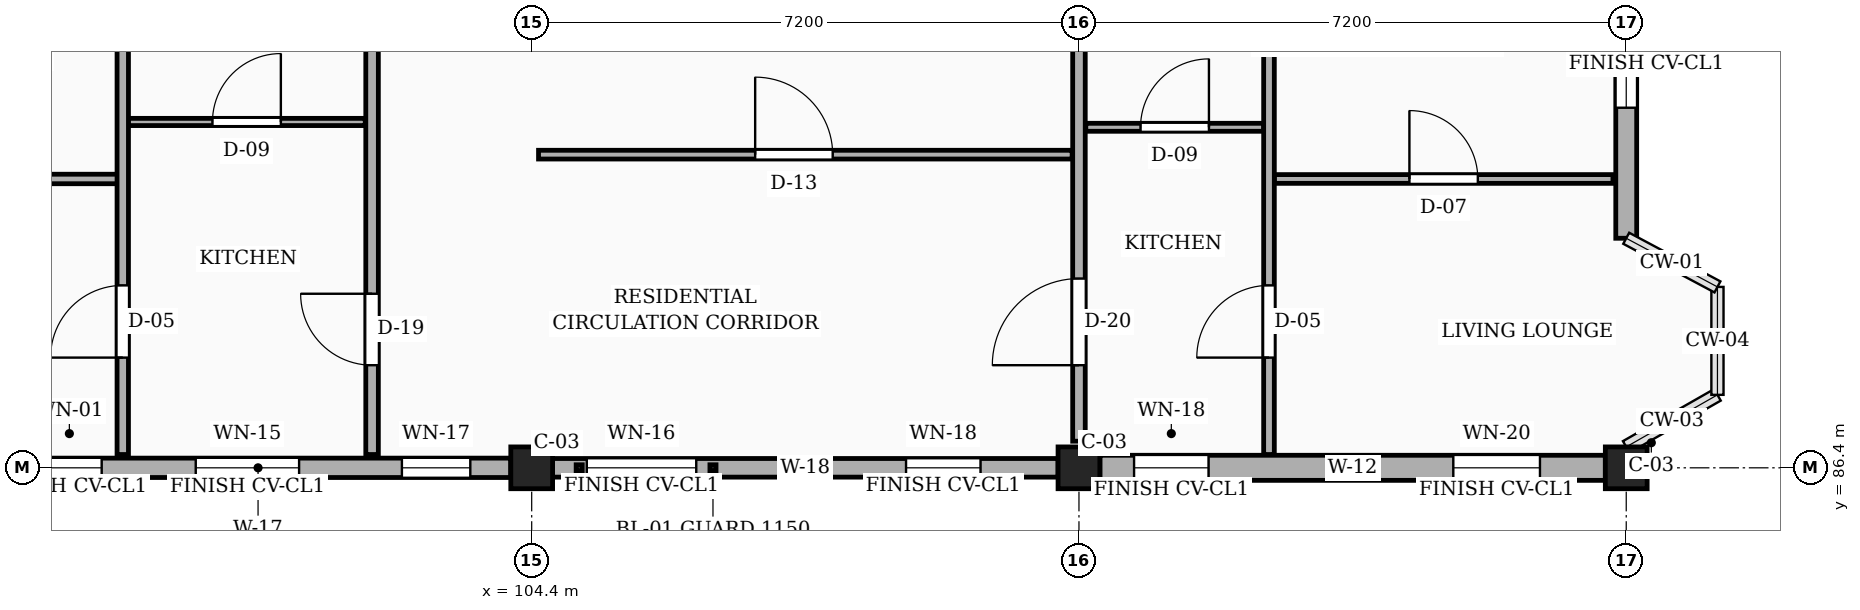
"""IFC4 building model, lengths in metres.
Left out: names, types, materials, properties, quantities, classifications, styles, units other than length and angle.
Written with IfcOpenShell. Run it as: python <this file> out.ifc"""

import sys

from ifc_helpers import new_model, si_unit, direction, frame, frame_2d, origin, origin_2d, place, context, subcontext, project, spatial, rectangle, extrude, element, fill, save


model = new_model("IFC4")
c1 = context("Model", 3, precision=1e-05, world=origin(), true_north=direction((0.0, 1.0)))
c2 = subcontext(c1, "Body", "Model", "MODEL_VIEW")
j1 = project(units=[si_unit("LENGTHUNIT", "METRE"), si_unit("PLANEANGLEUNIT", "RADIAN")], contexts=[c1])
p1 = place(None, origin())
s1 = spatial("IfcSite", under=j1, at=p1, CompositionType="ELEMENT")
p2 = place(p1, origin())
s2 = spatial("IfcBuilding", under=s1, at=p2, CompositionType="ELEMENT")
p3 = place(p2, frame((0.0, 0.0, 13.95)))
s3 = spatial("IfcBuildingStorey", under=s2, at=p3, CompositionType="ELEMENT", Elevation=13.95)
for number, where, z_axis, x_axis in (
    (1, (104.4, 86.4, 0.0), (0.0, 0.0, 1.0), (1.0, 0.0, 0.0)),
    (2, (111.6, 86.4, 0.0), (0.0, 0.0, 1.0), (1.0, 0.0, 0.0)),
    (3, (118.8, 86.4, 0.0), (0.0, 0.0, 1.0), (1.0, 0.0, 0.0)),
):
    element("IfcColumn", number, at=place(p3, frame(where, z_axis=z_axis, x_axis=x_axis)), inside=s3, PredefinedType="COLUMN", context=c2, shape_type="SweptSolid", body=[
        extrude(rectangle(XDim=0.55, YDim=0.55, at=origin_2d()), origin(), (0.0, 0.0, 1.0), 3.15),
    ])
p4 = place(p3, frame((97.475, 86.4, 0.0), z_axis=(0.0, 0.0, 1.0), x_axis=(1.0, 0.0, 0.0)))
e4 = element("IfcWall", 4, at=p4, inside=s3, PredefinedType="SOLIDWALL", context=c2, shape_type="SweptSolid", body=[
    extrude(rectangle(XDim=6.65, YDim=0.255, at=frame_2d((3.325, 0.0))), origin(), (0.0, 0.0, 1.0), 2.46),
])
p5 = place(p4, frame((0.417, 0.0, 0.78)))
e5 = element("IfcOpeningElement", 5, at=p5, cuts=e4, PredefinedType="OPENING", context=c2, shape_type="SweptSolid", body=[
    extrude(rectangle(XDim=0.85, YDim=1.15, at=frame_2d((0.425, 0.575))), frame((0.0, 0.137, 0.0), z_axis=(0.0, -1.0, 0.0), x_axis=(1.0, 0.0, 0.0)), (0.0, 0.0, 1.0), 0.275),
])
p6 = place(p4, frame((2.505, 0.0, 0.78)))
e6 = element("IfcOpeningElement", 6, at=p6, cuts=e4, PredefinedType="OPENING", context=c2, shape_type="SweptSolid", body=[
    extrude(rectangle(XDim=1.36, YDim=1.26, at=frame_2d((0.68, 0.63))), frame((0.0, 0.137, 0.0), z_axis=(0.0, -1.0, 0.0), x_axis=(1.0, 0.0, 0.0)), (0.0, 0.0, 1.0), 0.275),
])
p7 = place(p4, frame((5.218, 0.0, 0.78)))
e7 = element("IfcOpeningElement", 7, at=p7, cuts=e4, PredefinedType="OPENING", context=c2, shape_type="SweptSolid", body=[
    extrude(rectangle(XDim=0.9, YDim=1.36, at=frame_2d((0.45, 0.68))), frame((0.0, 0.137, 0.0), z_axis=(0.0, -1.0, 0.0), x_axis=(1.0, 0.0, 0.0)), (0.0, 0.0, 1.0), 0.275),
])
p8 = place(p3, frame((104.675, 86.4, 0.0), z_axis=(0.0, 0.0, 1.0), x_axis=(1.0, 0.0, 0.0)))
e8 = element("IfcWall", 8, at=p8, inside=s3, PredefinedType="SOLIDWALL", context=c2, shape_type="SweptSolid", body=[
    extrude(rectangle(XDim=6.65, YDim=0.245, at=frame_2d((3.325, 0.0))), origin(), (0.0, 0.0, 1.0), 2.46),
])
p9 = place(p8, frame((0.45, 0.0, 0.78)))
e9 = element("IfcOpeningElement", 9, at=p9, cuts=e8, PredefinedType="OPENING", context=c2, shape_type="SweptSolid", body=[
    extrude(rectangle(XDim=1.44, YDim=1.26, at=frame_2d((0.72, 0.63))), frame((0.0, 0.133, 0.0), z_axis=(0.0, -1.0, 0.0), x_axis=(1.0, 0.0, 0.0)), (0.0, 0.0, 1.0), 0.265),
])
p10 = place(p8, frame((4.65, 0.0, 0.78)))
e10 = element("IfcOpeningElement", 10, at=p10, cuts=e8, PredefinedType="OPENING", context=c2, shape_type="SweptSolid", body=[
    extrude(rectangle(XDim=0.98, YDim=1.36, at=frame_2d((0.49, 0.68))), frame((0.0, 0.133, 0.0), z_axis=(0.0, -1.0, 0.0), x_axis=(1.0, 0.0, 0.0)), (0.0, 0.0, 1.0), 0.265),
])
p11 = place(p3, frame((111.875, 86.4, 0.0), z_axis=(0.0, 0.0, 1.0), x_axis=(1.0, 0.0, 0.0)))
e11 = element("IfcWall", 11, at=p11, inside=s3, PredefinedType="SOLIDWALL", context=c2, shape_type="SweptSolid", body=[
    extrude(rectangle(XDim=6.65, YDim=0.33, at=frame_2d((3.325, 0.0))), origin(), (0.0, 0.0, 1.0), 2.46),
])
p12 = place(p11, frame((0.45, 0.0, 0.78)))
e12 = element("IfcOpeningElement", 12, at=p12, cuts=e11, PredefinedType="OPENING", context=c2, shape_type="SweptSolid", body=[
    extrude(rectangle(XDim=0.98, YDim=1.36, at=frame_2d((0.49, 0.68))), frame((0.0, 0.175, 0.0), z_axis=(0.0, -1.0, 0.0), x_axis=(1.0, 0.0, 0.0)), (0.0, 0.0, 1.0), 0.35),
])
p13 = place(p11, frame((4.65, 0.0, 0.78)))
e13 = element("IfcOpeningElement", 13, at=p13, cuts=e11, PredefinedType="OPENING", context=c2, shape_type="SweptSolid", body=[
    extrude(rectangle(XDim=1.14, YDim=1.36, at=frame_2d((0.57, 0.68))), frame((0.0, 0.175, 0.0), z_axis=(0.0, -1.0, 0.0), x_axis=(1.0, 0.0, 0.0)), (0.0, 0.0, 1.0), 0.35),
])
p14 = place(p3, frame((118.8, 89.42, 0.0), z_axis=(0.0, 0.0, 1.0), x_axis=(0.0, 1.0, 0.0)))
e14 = element("IfcWall", 14, at=p14, inside=s3, PredefinedType="SOLIDWALL", context=c2, shape_type="SweptSolid", body=[
    extrude(rectangle(XDim=3.905, YDim=0.275, at=frame_2d((1.953, 0.0))), origin(), (0.0, 0.0, 1.0), 2.46),
])
p15 = place(p14, frame((1.718, 0.0, 0.78)))
e15 = element("IfcOpeningElement", 15, at=p15, cuts=e14, PredefinedType="OPENING", context=c2, shape_type="SweptSolid", body=[
    extrude(rectangle(XDim=1.14, YDim=1.36, at=frame_2d((0.57, 0.68))), frame((0.0, 0.147, 0.0), z_axis=(0.0, -1.0, 0.0), x_axis=(1.0, 0.0, 0.0)), (0.0, 0.0, 1.0), 0.295),
])
p16 = place(p3, frame((102.3, 86.575, 0.0), z_axis=(0.0, 0.0, 1.0), x_axis=(0.0, 1.0, 0.0)))
e16 = element("IfcWall", 16, at=p16, inside=s3, PredefinedType="PARTITIONING", context=c2, shape_type="SweptSolid", body=[
    extrude(rectangle(XDim=7.005, YDim=0.165, at=frame_2d((3.502, 0.0))), origin(), (0.0, 0.0, 1.0), 2.325),
])
p17 = place(p16, frame((1.175, 0.0, 0.0)))
e17 = element("IfcOpeningElement", 17, at=p17, cuts=e16, PredefinedType="OPENING", context=c2, shape_type="SweptSolid", body=[
    extrude(rectangle(XDim=0.94, YDim=2.12, at=frame_2d((0.47, 1.06))), frame((0.0, 0.093, 0.0), z_axis=(0.0, -1.0, 0.0), x_axis=(1.0, 0.0, 0.0)), (0.0, 0.0, 1.0), 0.185),
])
p18 = place(p3, frame((111.6, 86.75, 0.0), z_axis=(0.0, 0.0, 1.0), x_axis=(0.0, 1.0, 0.0)))
e18 = element("IfcWall", 18, at=p18, inside=s3, PredefinedType="PARTITIONING", context=c2, shape_type="SweptSolid", body=[
    extrude(rectangle(XDim=6.5, YDim=0.165, at=frame_2d((3.25, 0.0))), origin(), (0.0, 0.0, 1.0), 2.325),
])
p19 = place(p18, frame((1.0, 0.0, 0.0)))
e19 = element("IfcOpeningElement", 19, at=p19, cuts=e18, PredefinedType="OPENING", context=c2, shape_type="SweptSolid", body=[
    extrude(rectangle(XDim=1.14, YDim=2.18, at=frame_2d((0.57, 1.09))), frame((0.0, 0.093, 0.0), z_axis=(0.0, -1.0, 0.0), x_axis=(1.0, 0.0, 0.0)), (0.0, 0.0, 1.0), 0.185),
])
p20 = place(p3, frame((104.49, 90.52, 0.0), z_axis=(0.0, 0.0, 1.0), x_axis=(1.0, 0.0, 0.0)))
e20 = element("IfcWall", 20, at=p20, inside=s3, PredefinedType="PARTITIONING", context=c2, shape_type="SweptSolid", body=[
    extrude(rectangle(XDim=7.02, YDim=0.115, at=frame_2d((3.51, 0.0))), origin(), (0.0, 0.0, 1.0), 2.325),
])
p21 = place(p20, frame((2.85, 0.0, 0.0)))
e21 = element("IfcOpeningElement", 21, at=p21, cuts=e20, PredefinedType="OPENING", context=c2, shape_type="SweptSolid", body=[
    extrude(rectangle(XDim=1.02, YDim=2.15, at=frame_2d((0.51, 1.075))), frame((0.0, 0.067, 0.0), z_axis=(0.0, -1.0, 0.0), x_axis=(1.0, 0.0, 0.0)), (0.0, 0.0, 1.0), 0.135),
])
p22 = place(p3, frame((90.175, 90.2, 0.0), z_axis=(0.0, 0.0, 1.0), x_axis=(1.0, 0.0, 0.0)))
e22 = element("IfcWall", 22, at=p22, inside=s3, PredefinedType="PARTITIONING", context=c2, shape_type="SweptSolid", body=[
    extrude(rectangle(XDim=8.775, YDim=0.125, at=frame_2d((4.387, 0.0))), origin(), (0.0, 0.0, 1.0), 2.325),
])
p23 = place(p22, frame((3.938, 0.0, 0.0)))
e23 = element("IfcOpeningElement", 23, at=p23, cuts=e22, PredefinedType="OPENING", context=c2, shape_type="SweptSolid", body=[
    extrude(rectangle(XDim=0.9, YDim=2.1, at=frame_2d((0.45, 1.05))), frame((0.0, 0.073, 0.0), z_axis=(0.0, -1.0, 0.0), x_axis=(1.0, 0.0, 0.0)), (0.0, 0.0, 1.0), 0.145),
])
p24 = place(p3, frame((99.09, 90.95, 0.0), z_axis=(0.0, 0.0, 1.0), x_axis=(1.0, 0.0, 0.0)))
e24 = element("IfcWall", 24, at=p24, inside=s3, PredefinedType="PARTITIONING", context=c2, shape_type="SweptSolid", body=[
    extrude(rectangle(XDim=3.12, YDim=0.095, at=frame_2d((1.56, 0.0))), origin(), (0.0, 0.0, 1.0), 2.325),
])
p25 = place(p24, frame((1.11, 0.0, 0.0)))
e25 = element("IfcOpeningElement", 25, at=p25, cuts=e24, PredefinedType="OPENING", context=c2, shape_type="SweptSolid", body=[
    extrude(rectangle(XDim=0.9, YDim=2.05, at=frame_2d((0.45, 1.025))), frame((0.0, 0.058, 0.0), z_axis=(0.0, -1.0, 0.0), x_axis=(1.0, 0.0, 0.0)), (0.0, 0.0, 1.0), 0.115),
])
p26 = place(p3, frame((99.02, 86.575, 0.0), z_axis=(0.0, 0.0, 1.0), x_axis=(0.0, 1.0, 0.0)))
e26 = element("IfcWall", 26, at=p26, inside=s3, PredefinedType="PARTITIONING", context=c2, shape_type="SweptSolid", body=[
    extrude(rectangle(XDim=6.885, YDim=0.15, at=frame_2d((3.442, 0.0))), origin(), (0.0, 0.0, 1.0), 2.325),
])
p27 = place(p26, frame((1.275, 0.0, 0.0)))
e27 = element("IfcOpeningElement", 27, at=p27, cuts=e26, PredefinedType="OPENING", context=c2, shape_type="SweptSolid", body=[
    extrude(rectangle(XDim=0.95, YDim=2.1, at=frame_2d((0.475, 1.05))), frame((0.0, 0.085, 0.0), z_axis=(0.0, -1.0, 0.0), x_axis=(1.0, 0.0, 0.0)), (0.0, 0.0, 1.0), 0.17),
])
p28 = place(p3, frame((114.17, 90.2, 0.0), z_axis=(0.0, 0.0, 1.0), x_axis=(1.0, 0.0, 0.0)))
e28 = element("IfcWall", 28, at=p28, inside=s3, PredefinedType="PARTITIONING", context=c2, shape_type="SweptSolid", body=[
    extrude(rectangle(XDim=4.455, YDim=0.115, at=frame_2d((2.228, 0.0))), origin(), (0.0, 0.0, 1.0), 2.325),
])
p29 = place(p28, frame((1.778, 0.0, 0.0)))
e29 = element("IfcOpeningElement", 29, at=p29, cuts=e28, PredefinedType="OPENING", context=c2, shape_type="SweptSolid", body=[
    extrude(rectangle(XDim=0.9, YDim=2.1, at=frame_2d((0.45, 1.05))), frame((0.0, 0.067, 0.0), z_axis=(0.0, -1.0, 0.0), x_axis=(1.0, 0.0, 0.0)), (0.0, 0.0, 1.0), 0.135),
])
p30 = place(p3, frame((111.69, 90.88, 0.0), z_axis=(0.0, 0.0, 1.0), x_axis=(1.0, 0.0, 0.0)))
e30 = element("IfcWall", 30, at=p30, inside=s3, PredefinedType="PARTITIONING", context=c2, shape_type="SweptSolid", body=[
    extrude(rectangle(XDim=2.34, YDim=0.105, at=frame_2d((1.17, 0.0))), origin(), (0.0, 0.0, 1.0), 2.325),
])
p31 = place(p30, frame((0.72, 0.0, 0.0)))
e31 = element("IfcOpeningElement", 31, at=p31, cuts=e30, PredefinedType="OPENING", context=c2, shape_type="SweptSolid", body=[
    extrude(rectangle(XDim=0.9, YDim=2.05, at=frame_2d((0.45, 1.025))), frame((0.0, 0.062, 0.0), z_axis=(0.0, -1.0, 0.0), x_axis=(1.0, 0.0, 0.0)), (0.0, 0.0, 1.0), 0.125),
])
p32 = place(p3, frame((114.1, 86.575, 0.0), z_axis=(0.0, 0.0, 1.0), x_axis=(0.0, 1.0, 0.0)))
e32 = element("IfcWall", 32, at=p32, inside=s3, PredefinedType="PARTITIONING", context=c2, shape_type="SweptSolid", body=[
    extrude(rectangle(XDim=6.885, YDim=0.14, at=frame_2d((3.442, 0.0))), origin(), (0.0, 0.0, 1.0), 2.325),
])
p33 = place(p32, frame((1.275, 0.0, 0.0)))
e33 = element("IfcOpeningElement", 33, at=p33, cuts=e32, PredefinedType="OPENING", context=c2, shape_type="SweptSolid", body=[
    extrude(rectangle(XDim=0.95, YDim=2.1, at=frame_2d((0.475, 1.05))), frame((0.0, 0.08, 0.0), z_axis=(0.0, -1.0, 0.0), x_axis=(1.0, 0.0, 0.0)), (0.0, 0.0, 1.0), 0.16),
])
p34 = place(p5, origin())
e34 = element("IfcWindow", 34, at=p34, inside=s3, PartitioningType="SINGLE_PANEL", PredefinedType="WINDOW", context=c2, shape_type="SweptSolid", body=[
    extrude(rectangle(XDim=0.85, YDim=1.15, at=frame_2d((0.425, 0.575))), frame((0.0, 0.03, 0.0), z_axis=(0.0, -1.0, 0.0), x_axis=(1.0, 0.0, 0.0)), (0.0, 0.0, 1.0), 0.06),
])
fill(e5, e34)
p35 = place(p6, origin())
e35 = element("IfcWindow", 35, at=p35, inside=s3, PartitioningType="SINGLE_PANEL", PredefinedType="WINDOW", context=c2, shape_type="SweptSolid", body=[
    extrude(rectangle(XDim=1.36, YDim=1.26, at=frame_2d((0.68, 0.63))), frame((0.0, 0.03, 0.0), z_axis=(0.0, -1.0, 0.0), x_axis=(1.0, 0.0, 0.0)), (0.0, 0.0, 1.0), 0.06),
])
fill(e6, e35)
p36 = place(p7, origin())
e36 = element("IfcWindow", 36, at=p36, inside=s3, PartitioningType="SINGLE_PANEL", PredefinedType="WINDOW", context=c2, shape_type="SweptSolid", body=[
    extrude(rectangle(XDim=0.9, YDim=1.36, at=frame_2d((0.45, 0.68))), frame((0.0, 0.03, 0.0), z_axis=(0.0, -1.0, 0.0), x_axis=(1.0, 0.0, 0.0)), (0.0, 0.0, 1.0), 0.06),
])
fill(e7, e36)
p37 = place(p9, origin())
e37 = element("IfcWindow", 37, at=p37, inside=s3, PartitioningType="SINGLE_PANEL", PredefinedType="WINDOW", context=c2, shape_type="SweptSolid", body=[
    extrude(rectangle(XDim=1.44, YDim=1.26, at=frame_2d((0.72, 0.63))), frame((0.0, 0.03, 0.0), z_axis=(0.0, -1.0, 0.0), x_axis=(1.0, 0.0, 0.0)), (0.0, 0.0, 1.0), 0.06),
])
fill(e9, e37)
p38 = place(p10, origin())
e38 = element("IfcWindow", 38, at=p38, inside=s3, PartitioningType="SINGLE_PANEL", PredefinedType="WINDOW", context=c2, shape_type="SweptSolid", body=[
    extrude(rectangle(XDim=0.98, YDim=1.36, at=frame_2d((0.49, 0.68))), frame((0.0, 0.03, 0.0), z_axis=(0.0, -1.0, 0.0), x_axis=(1.0, 0.0, 0.0)), (0.0, 0.0, 1.0), 0.06),
])
fill(e10, e38)
p39 = place(p12, origin())
e39 = element("IfcWindow", 39, at=p39, inside=s3, PartitioningType="SINGLE_PANEL", PredefinedType="WINDOW", context=c2, shape_type="SweptSolid", body=[
    extrude(rectangle(XDim=0.98, YDim=1.36, at=frame_2d((0.49, 0.68))), frame((0.0, 0.03, 0.0), z_axis=(0.0, -1.0, 0.0), x_axis=(1.0, 0.0, 0.0)), (0.0, 0.0, 1.0), 0.06),
])
fill(e12, e39)
p40 = place(p13, origin())
e40 = element("IfcWindow", 40, at=p40, inside=s3, PartitioningType="SINGLE_PANEL", PredefinedType="WINDOW", context=c2, shape_type="SweptSolid", body=[
    extrude(rectangle(XDim=1.14, YDim=1.36, at=frame_2d((0.57, 0.68))), frame((0.0, 0.03, 0.0), z_axis=(0.0, -1.0, 0.0), x_axis=(1.0, 0.0, 0.0)), (0.0, 0.0, 1.0), 0.06),
])
fill(e13, e40)
p41 = place(p15, origin())
e41 = element("IfcWindow", 41, at=p41, inside=s3, PartitioningType="SINGLE_PANEL", PredefinedType="WINDOW", context=c2, shape_type="SweptSolid", body=[
    extrude(rectangle(XDim=1.14, YDim=1.36, at=frame_2d((0.57, 0.68))), frame((0.0, 0.03, 0.0), z_axis=(0.0, -1.0, 0.0), x_axis=(1.0, 0.0, 0.0)), (0.0, 0.0, 1.0), 0.06),
])
fill(e15, e41)
p42 = place(p17, origin())
e42 = element("IfcDoor", 42, at=p42, inside=s3, OperationType="SINGLE_SWING_RIGHT", PredefinedType="DOOR", context=c2, shape_type="SweptSolid", body=[
    extrude(rectangle(XDim=0.94, YDim=2.12, at=frame_2d((0.47, 1.06))), frame((0.0, 0.025, 0.0), z_axis=(0.0, -1.0, 0.0), x_axis=(1.0, 0.0, 0.0)), (0.0, 0.0, 1.0), 0.05),
])
fill(e17, e42)
p43 = place(p19, origin())
e43 = element("IfcDoor", 43, at=p43, inside=s3, OperationType="SINGLE_SWING_LEFT", PredefinedType="DOOR", context=c2, shape_type="SweptSolid", body=[
    extrude(rectangle(XDim=1.14, YDim=2.18, at=frame_2d((0.57, 1.09))), frame((0.0, 0.025, 0.0), z_axis=(0.0, -1.0, 0.0), x_axis=(1.0, 0.0, 0.0)), (0.0, 0.0, 1.0), 0.05),
])
fill(e19, e43)
p44 = place(p21, origin())
e44 = element("IfcDoor", 44, at=p44, inside=s3, OperationType="SINGLE_SWING_LEFT", PredefinedType="DOOR", context=c2, shape_type="SweptSolid", body=[
    extrude(rectangle(XDim=1.02, YDim=2.15, at=frame_2d((0.51, 1.075))), frame((0.0, 0.025, 0.0), z_axis=(0.0, -1.0, 0.0), x_axis=(1.0, 0.0, 0.0)), (0.0, 0.0, 1.0), 0.05),
])
fill(e21, e44)
p45 = place(p25, origin())
e45 = element("IfcDoor", 45, at=p45, inside=s3, OperationType="SINGLE_SWING_RIGHT", PredefinedType="DOOR", context=c2, shape_type="SweptSolid", body=[
    extrude(rectangle(XDim=0.9, YDim=2.05, at=frame_2d((0.45, 1.025))), frame((0.0, 0.025, 0.0), z_axis=(0.0, -1.0, 0.0), x_axis=(1.0, 0.0, 0.0)), (0.0, 0.0, 1.0), 0.05),
])
fill(e25, e45)
p46 = place(p27, origin())
e46 = element("IfcDoor", 46, at=p46, inside=s3, OperationType="SINGLE_SWING_LEFT", PredefinedType="DOOR", context=c2, shape_type="SweptSolid", body=[
    extrude(rectangle(XDim=0.95, YDim=2.1, at=frame_2d((0.475, 1.05))), frame((0.0, 0.025, 0.0), z_axis=(0.0, -1.0, 0.0), x_axis=(1.0, 0.0, 0.0)), (0.0, 0.0, 1.0), 0.05),
])
fill(e27, e46)
p47 = place(p29, origin())
e47 = element("IfcDoor", 47, at=p47, inside=s3, OperationType="SINGLE_SWING_LEFT", PredefinedType="DOOR", context=c2, shape_type="SweptSolid", body=[
    extrude(rectangle(XDim=0.9, YDim=2.1, at=frame_2d((0.45, 1.05))), frame((0.0, 0.025, 0.0), z_axis=(0.0, -1.0, 0.0), x_axis=(1.0, 0.0, 0.0)), (0.0, 0.0, 1.0), 0.05),
])
fill(e29, e47)
p48 = place(p31, origin())
e48 = element("IfcDoor", 48, at=p48, inside=s3, OperationType="SINGLE_SWING_RIGHT", PredefinedType="DOOR", context=c2, shape_type="SweptSolid", body=[
    extrude(rectangle(XDim=0.9, YDim=2.05, at=frame_2d((0.45, 1.025))), frame((0.0, 0.025, 0.0), z_axis=(0.0, -1.0, 0.0), x_axis=(1.0, 0.0, 0.0)), (0.0, 0.0, 1.0), 0.05),
])
fill(e31, e48)
p49 = place(p33, origin())
e49 = element("IfcDoor", 49, at=p49, inside=s3, OperationType="SINGLE_SWING_LEFT", PredefinedType="DOOR", context=c2, shape_type="SweptSolid", body=[
    extrude(rectangle(XDim=0.95, YDim=2.1, at=frame_2d((0.475, 1.05))), frame((0.0, 0.025, 0.0), z_axis=(0.0, -1.0, 0.0), x_axis=(1.0, 0.0, 0.0)), (0.0, 0.0, 1.0), 0.05),
])
fill(e33, e49)
save(model, sys.argv[1])
